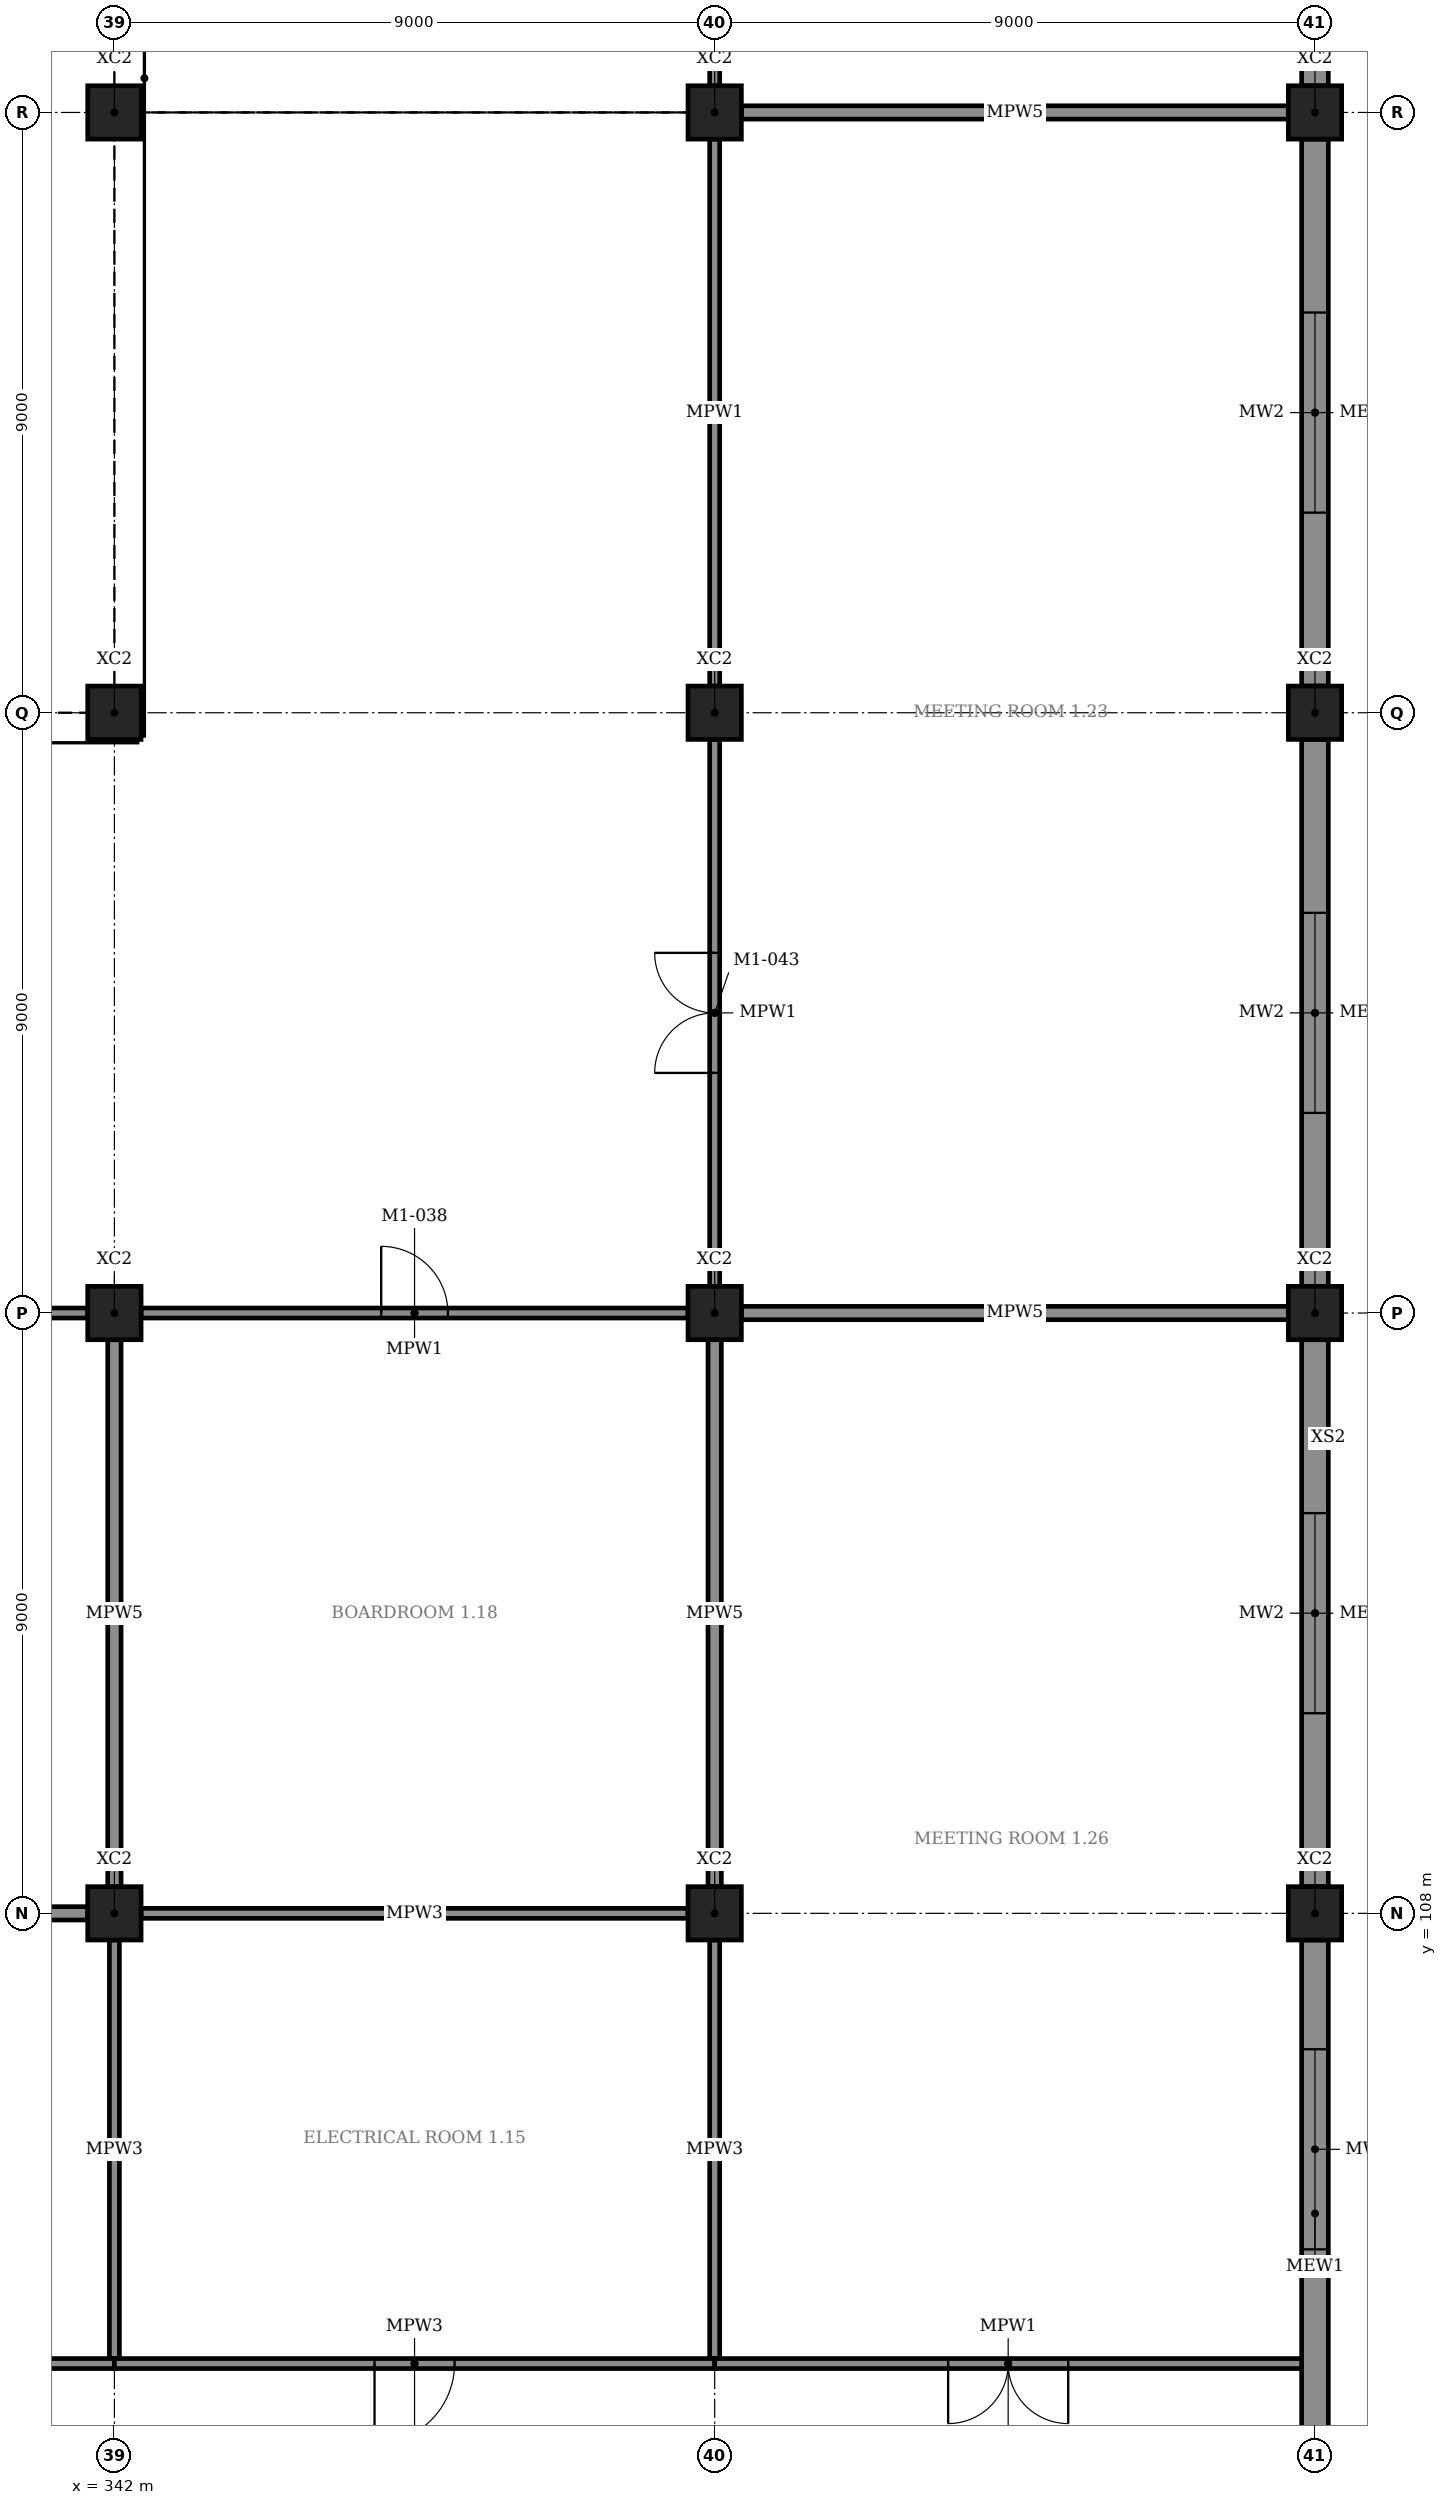
"""IFC4 building model, lengths in metres.
Left out: names, types, materials, properties, quantities, classifications, styles, units other than length and angle.
Written with IfcOpenShell. Run it as: python <this file> out.ifc"""

import sys

from ifc_helpers import new_model, si_unit, direction, frame, frame_2d, origin, origin_2d, place, context, subcontext, project, spatial, rectangle, extrude, element, fill, save


model = new_model("IFC4")
c1 = context("Model", 3, precision=1e-05, world=origin(), true_north=direction((0.0, 1.0)))
c2 = subcontext(c1, "Body", "Model", "MODEL_VIEW")
j1 = project(units=[si_unit("LENGTHUNIT", "METRE"), si_unit("PLANEANGLEUNIT", "RADIAN")], contexts=[c1])
p1 = place(None, origin())
s1 = spatial("IfcSite", under=j1, at=p1, CompositionType="ELEMENT")
p2 = place(p1, origin())
s2 = spatial("IfcBuilding", under=s1, at=p2, CompositionType="ELEMENT")
p3 = place(p2, frame((0.0, 0.0, 6.0)))
s3 = spatial("IfcBuildingStorey", under=s2, at=p3, CompositionType="ELEMENT", Elevation=6.0)
for number, where, z_axis, x_axis in (
    (1, (342.0, 108.0, 0.0), (0.0, 0.0, 1.0), (1.0, 0.0, 0.0)),
    (2, (342.0, 117.0, 0.0), (0.0, 0.0, 1.0), (1.0, 0.0, 0.0)),
    (3, (342.0, 126.0, 0.0), (0.0, 0.0, 1.0), (1.0, 0.0, 0.0)),
    (4, (342.0, 135.0, 0.0), (0.0, 0.0, 1.0), (1.0, 0.0, 0.0)),
    (5, (351.0, 108.0, 0.0), (0.0, 0.0, 1.0), (1.0, 0.0, 0.0)),
    (6, (351.0, 117.0, 0.0), (0.0, 0.0, 1.0), (1.0, 0.0, 0.0)),
    (7, (351.0, 126.0, 0.0), (0.0, 0.0, 1.0), (1.0, 0.0, 0.0)),
    (8, (351.0, 135.0, 0.0), (0.0, 0.0, 1.0), (1.0, 0.0, 0.0)),
    (9, (360.0, 108.0, 0.0), (0.0, 0.0, 1.0), (1.0, 0.0, 0.0)),
    (10, (360.0, 117.0, 0.0), (0.0, 0.0, 1.0), (1.0, 0.0, 0.0)),
    (11, (360.0, 126.0, 0.0), (0.0, 0.0, 1.0), (1.0, 0.0, 0.0)),
    (12, (360.0, 135.0, 0.0), (0.0, 0.0, 1.0), (1.0, 0.0, 0.0)),
):
    element("IfcColumn", number, at=place(p3, frame(where, z_axis=z_axis, x_axis=x_axis)), inside=s3, PredefinedType="COLUMN", context=c2, shape_type="SweptSolid", body=[
        extrude(rectangle(XDim=0.8, YDim=0.8, at=origin_2d()), origin(), (0.0, 0.0, 1.0), 5.5),
    ])
p4 = place(p3, frame((360.0, 99.4, 0.0), z_axis=(0.0, 0.0, 1.0), x_axis=(0.0, 1.0, 0.0)))
e13 = element("IfcWall", 13, at=p4, inside=s3, PredefinedType="STANDARD", context=c2, shape_type="SweptSolid", body=[
    extrude(rectangle(XDim=8.2, YDim=0.4, at=frame_2d((4.1, 0.0))), origin(), (0.0, 0.0, 1.0), 4.32),
])
p5 = place(p4, frame((3.562, 0.0, 0.9)))
e14 = element("IfcOpeningElement", 14, at=p5, cuts=e13, PredefinedType="OPENING", context=c2, shape_type="SweptSolid", body=[
    extrude(rectangle(XDim=3.0, YDim=2.1, at=frame_2d((1.5, 1.05))), frame((0.0, 0.21, 0.0), z_axis=(0.0, -1.0, 0.0), x_axis=(1.0, 0.0, 0.0)), (0.0, 0.0, 1.0), 0.42),
])
p6 = place(p3, frame((360.0, 108.4, 0.0), z_axis=(0.0, 0.0, 1.0), x_axis=(0.0, 1.0, 0.0)))
e15 = element("IfcWall", 15, at=p6, inside=s3, PredefinedType="STANDARD", context=c2, shape_type="SweptSolid", body=[
    extrude(rectangle(XDim=8.2, YDim=0.4, at=frame_2d((4.1, 0.0))), origin(), (0.0, 0.0, 1.0), 4.32),
])
p7 = place(p6, frame((2.6, 0.0, 0.9)))
e16 = element("IfcOpeningElement", 16, at=p7, cuts=e15, PredefinedType="OPENING", context=c2, shape_type="SweptSolid", body=[
    extrude(rectangle(XDim=3.0, YDim=2.1, at=frame_2d((1.5, 1.05))), frame((0.0, 0.21, 0.0), z_axis=(0.0, -1.0, 0.0), x_axis=(1.0, 0.0, 0.0)), (0.0, 0.0, 1.0), 0.42),
])
p8 = place(p3, frame((360.0, 117.4, 0.0), z_axis=(0.0, 0.0, 1.0), x_axis=(0.0, 1.0, 0.0)))
e17 = element("IfcWall", 17, at=p8, inside=s3, PredefinedType="STANDARD", context=c2, shape_type="SweptSolid", body=[
    extrude(rectangle(XDim=8.2, YDim=0.4, at=frame_2d((4.1, 0.0))), origin(), (0.0, 0.0, 1.0), 4.32),
])
p9 = place(p8, frame((2.6, 0.0, 0.9)))
e18 = element("IfcOpeningElement", 18, at=p9, cuts=e17, PredefinedType="OPENING", context=c2, shape_type="SweptSolid", body=[
    extrude(rectangle(XDim=3.0, YDim=2.1, at=frame_2d((1.5, 1.05))), frame((0.0, 0.21, 0.0), z_axis=(0.0, -1.0, 0.0), x_axis=(1.0, 0.0, 0.0)), (0.0, 0.0, 1.0), 0.42),
])
p10 = place(p3, frame((360.0, 126.4, 0.0), z_axis=(0.0, 0.0, 1.0), x_axis=(0.0, 1.0, 0.0)))
e19 = element("IfcWall", 19, at=p10, inside=s3, PredefinedType="STANDARD", context=c2, shape_type="SweptSolid", body=[
    extrude(rectangle(XDim=8.2, YDim=0.4, at=frame_2d((4.1, 0.0))), origin(), (0.0, 0.0, 1.0), 4.32),
])
p11 = place(p10, frame((2.6, 0.0, 0.9)))
e20 = element("IfcOpeningElement", 20, at=p11, cuts=e19, PredefinedType="OPENING", context=c2, shape_type="SweptSolid", body=[
    extrude(rectangle(XDim=3.0, YDim=2.1, at=frame_2d((1.5, 1.05))), frame((0.0, 0.21, 0.0), z_axis=(0.0, -1.0, 0.0), x_axis=(1.0, 0.0, 0.0)), (0.0, 0.0, 1.0), 0.42),
])
p12 = place(p3, frame((360.0, 135.4, 0.0), z_axis=(0.0, 0.0, 1.0), x_axis=(0.0, 1.0, 0.0)))
e21 = element("IfcWall", 21, at=p12, inside=s3, PredefinedType="STANDARD", context=c2, shape_type="SweptSolid", body=[
    extrude(rectangle(XDim=8.2, YDim=0.4, at=frame_2d((4.1, 0.0))), origin(), (0.0, 0.0, 1.0), 4.32),
])
p13 = place(p12, frame((2.6, 0.0, 0.9)))
e22 = element("IfcOpeningElement", 22, at=p13, cuts=e21, PredefinedType="OPENING", context=c2, shape_type="SweptSolid", body=[
    extrude(rectangle(XDim=3.0, YDim=2.1, at=frame_2d((1.5, 1.05))), frame((0.0, 0.21, 0.0), z_axis=(0.0, -1.0, 0.0), x_axis=(1.0, 0.0, 0.0)), (0.0, 0.0, 1.0), 0.42),
])
p14 = place(p3, frame((324.0, 101.25, 0.0), z_axis=(0.0, 0.0, 1.0), x_axis=(1.0, 0.0, 0.0)))
e23 = element("IfcWall", 23, at=p14, inside=s3, PredefinedType="PARTITIONING", context=c2, shape_type="SweptSolid", body=[
    extrude(rectangle(XDim=18.0, YDim=0.15, at=frame_2d((9.0, 0.0))), origin(), (0.0, 0.0, 1.0), 4.32),
])
p15 = place(p14, frame((8.1, 0.0, 0.0)))
e24 = element("IfcOpeningElement", 24, at=p15, cuts=e23, PredefinedType="OPENING", context=c2, shape_type="SweptSolid", body=[
    extrude(rectangle(XDim=1.8, YDim=2.4, at=frame_2d((0.9, 1.2))), frame((0.0, 0.085, 0.0), z_axis=(0.0, -1.0, 0.0), x_axis=(1.0, 0.0, 0.0)), (0.0, 0.0, 1.0), 0.17),
])
p16 = place(p3, frame((333.4, 108.0, 0.0), z_axis=(0.0, 0.0, 1.0), x_axis=(1.0, 0.0, 0.0)))
e25 = element("IfcWall", 25, at=p16, inside=s3, PredefinedType="PARTITIONING", context=c2, shape_type="SweptSolid", body=[
    extrude(rectangle(XDim=8.2, YDim=0.2, at=frame_2d((4.1, 0.0))), origin(), (0.0, 0.0, 1.0), 4.32),
])
p17 = place(p3, frame((342.0, 101.325, 0.0), z_axis=(0.0, 0.0, 1.0), x_axis=(0.0, 1.0, 0.0)))
e26 = element("IfcWall", 26, at=p17, inside=s3, PredefinedType="PARTITIONING", context=c2, shape_type="SweptSolid", body=[
    extrude(rectangle(XDim=6.275, YDim=0.15, at=frame_2d((3.138, 0.0))), origin(), (0.0, 0.0, 1.0), 4.32),
])
p18 = place(p3, frame((342.0, 101.25, 0.0), z_axis=(0.0, 0.0, 1.0), x_axis=(1.0, 0.0, 0.0)))
e27 = element("IfcWall", 27, at=p18, inside=s3, PredefinedType="PARTITIONING", context=c2, shape_type="SweptSolid", body=[
    extrude(rectangle(XDim=9.0, YDim=0.15, at=frame_2d((4.5, 0.0))), origin(), (0.0, 0.0, 1.0), 4.32),
])
p19 = place(p18, frame((3.9, 0.0, 0.0)))
e28 = element("IfcOpeningElement", 28, at=p19, cuts=e27, PredefinedType="OPENING", context=c2, shape_type="SweptSolid", body=[
    extrude(rectangle(XDim=1.2, YDim=2.4, at=frame_2d((0.6, 1.2))), frame((0.0, 0.085, 0.0), z_axis=(0.0, -1.0, 0.0), x_axis=(1.0, 0.0, 0.0)), (0.0, 0.0, 1.0), 0.17),
])
p20 = place(p3, frame((342.4, 108.0, 0.0), z_axis=(0.0, 0.0, 1.0), x_axis=(1.0, 0.0, 0.0)))
e29 = element("IfcWall", 29, at=p20, inside=s3, PredefinedType="PARTITIONING", context=c2, shape_type="SweptSolid", body=[
    extrude(rectangle(XDim=8.2, YDim=0.15, at=frame_2d((4.1, 0.0))), origin(), (0.0, 0.0, 1.0), 4.32),
])
p21 = place(p3, frame((351.0, 101.325, 0.0), z_axis=(0.0, 0.0, 1.0), x_axis=(0.0, 1.0, 0.0)))
e30 = element("IfcWall", 30, at=p21, inside=s3, PredefinedType="PARTITIONING", context=c2, shape_type="SweptSolid", body=[
    extrude(rectangle(XDim=6.275, YDim=0.15, at=frame_2d((3.138, 0.0))), origin(), (0.0, 0.0, 1.0), 4.32),
])
p22 = place(p3, frame((333.4, 117.0, 0.0), z_axis=(0.0, 0.0, 1.0), x_axis=(1.0, 0.0, 0.0)))
e31 = element("IfcWall", 31, at=p22, inside=s3, PredefinedType="PARTITIONING", context=c2, shape_type="SweptSolid", body=[
    extrude(rectangle(XDim=8.2, YDim=0.15, at=frame_2d((4.1, 0.0))), origin(), (0.0, 0.0, 1.0), 4.32),
])
p23 = place(p3, frame((342.0, 108.4, 0.0), z_axis=(0.0, 0.0, 1.0), x_axis=(0.0, 1.0, 0.0)))
e32 = element("IfcWall", 32, at=p23, inside=s3, PredefinedType="PARTITIONING", context=c2, shape_type="SweptSolid", body=[
    extrude(rectangle(XDim=8.2, YDim=0.2, at=frame_2d((4.1, 0.0))), origin(), (0.0, 0.0, 1.0), 4.32),
])
p24 = place(p3, frame((342.4, 117.0, 0.0), z_axis=(0.0, 0.0, 1.0), x_axis=(1.0, 0.0, 0.0)))
e33 = element("IfcWall", 33, at=p24, inside=s3, PredefinedType="PARTITIONING", context=c2, shape_type="SweptSolid", body=[
    extrude(rectangle(XDim=8.2, YDim=0.15, at=frame_2d((4.1, 0.0))), origin(), (0.0, 0.0, 1.0), 4.32),
])
p25 = place(p24, frame((3.6, 0.0, 0.0)))
e34 = element("IfcOpeningElement", 34, at=p25, cuts=e33, PredefinedType="OPENING", context=c2, shape_type="SweptSolid", body=[
    extrude(rectangle(XDim=1.0, YDim=2.4, at=frame_2d((0.5, 1.2))), frame((0.0, 0.085, 0.0), z_axis=(0.0, -1.0, 0.0), x_axis=(1.0, 0.0, 0.0)), (0.0, 0.0, 1.0), 0.17),
])
for number, where, z_axis, x_axis in (
    (35, (351.0, 108.4, 0.0), (0.0, 0.0, 1.0), (0.0, 1.0, 0.0)),
    (36, (351.4, 117.0, 0.0), (0.0, 0.0, 1.0), (1.0, 0.0, 0.0)),
    (37, (351.4, 135.0, 0.0), (0.0, 0.0, 1.0), (1.0, 0.0, 0.0)),
):
    element("IfcWall", number, at=place(p3, frame(where, z_axis=z_axis, x_axis=x_axis)), inside=s3, PredefinedType="PARTITIONING", context=c2, shape_type="SweptSolid", body=[
        extrude(rectangle(XDim=8.2, YDim=0.2, at=frame_2d((4.1, 0.0))), origin(), (0.0, 0.0, 1.0), 4.32),
    ])
p26 = place(p3, frame((351.0, 117.4, 0.0), z_axis=(0.0, 0.0, 1.0), x_axis=(0.0, 1.0, 0.0)))
e38 = element("IfcWall", 38, at=p26, inside=s3, PredefinedType="PARTITIONING", context=c2, shape_type="SweptSolid", body=[
    extrude(rectangle(XDim=8.2, YDim=0.15, at=frame_2d((4.1, 0.0))), origin(), (0.0, 0.0, 1.0), 4.32),
])
p27 = place(p26, frame((3.2, 0.0, 0.0)))
e39 = element("IfcOpeningElement", 39, at=p27, cuts=e38, PredefinedType="OPENING", context=c2, shape_type="SweptSolid", body=[
    extrude(rectangle(XDim=1.8, YDim=2.4, at=frame_2d((0.9, 1.2))), frame((0.0, 0.085, 0.0), z_axis=(0.0, -1.0, 0.0), x_axis=(1.0, 0.0, 0.0)), (0.0, 0.0, 1.0), 0.17),
])
p28 = place(p3, frame((351.0, 126.4, 0.0), z_axis=(0.0, 0.0, 1.0), x_axis=(0.0, 1.0, 0.0)))
e40 = element("IfcWall", 40, at=p28, inside=s3, PredefinedType="PARTITIONING", context=c2, shape_type="SweptSolid", body=[
    extrude(rectangle(XDim=8.2, YDim=0.15, at=frame_2d((4.1, 0.0))), origin(), (0.0, 0.0, 1.0), 4.32),
])
p29 = place(p3, frame((351.0, 135.4, 0.0), z_axis=(0.0, 0.0, 1.0), x_axis=(0.0, 1.0, 0.0)))
e41 = element("IfcWall", 41, at=p29, inside=s3, PredefinedType="PARTITIONING", context=c2, shape_type="SweptSolid", body=[
    extrude(rectangle(XDim=8.2, YDim=0.15, at=frame_2d((4.1, 0.0))), origin(), (0.0, 0.0, 1.0), 4.32),
])
p30 = place(p29, frame((6.3, 0.0, 0.0)))
e42 = element("IfcOpeningElement", 42, at=p30, cuts=e41, PredefinedType="OPENING", context=c2, shape_type="SweptSolid", body=[
    extrude(rectangle(XDim=1.0, YDim=2.4, at=frame_2d((0.5, 1.2))), frame((0.0, 0.085, 0.0), z_axis=(0.0, -1.0, 0.0), x_axis=(1.0, 0.0, 0.0)), (0.0, 0.0, 1.0), 0.17),
])
p31 = place(p3, frame((351.0, 101.25, 0.0), z_axis=(0.0, 0.0, 1.0), x_axis=(1.0, 0.0, 0.0)))
e43 = element("IfcWall", 43, at=p31, inside=s3, PredefinedType="PARTITIONING", context=c2, shape_type="SweptSolid", body=[
    extrude(rectangle(XDim=8.8, YDim=0.15, at=frame_2d((4.4, 0.0))), origin(), (0.0, 0.0, 1.0), 4.32),
])
p32 = place(p31, frame((3.5, 0.0, 0.0)))
e44 = element("IfcOpeningElement", 44, at=p32, cuts=e43, PredefinedType="OPENING", context=c2, shape_type="SweptSolid", body=[
    extrude(rectangle(XDim=1.8, YDim=2.4, at=frame_2d((0.9, 1.2))), frame((0.0, 0.085, 0.0), z_axis=(0.0, -1.0, 0.0), x_axis=(1.0, 0.0, 0.0)), (0.0, 0.0, 1.0), 0.17),
])
p33 = place(p5, origin())
e45 = element("IfcWindow", 45, at=p33, inside=s3, PartitioningType="TRIPLE_PANEL_VERTICAL", PredefinedType="WINDOW", context=c2, shape_type="SweptSolid", body=[
    extrude(rectangle(XDim=3.0, YDim=2.1, at=frame_2d((1.5, 1.05))), frame((0.0, 0.03, 0.0), z_axis=(0.0, -1.0, 0.0), x_axis=(1.0, 0.0, 0.0)), (0.0, 0.0, 1.0), 0.06),
])
fill(e14, e45)
p34 = place(p7, origin())
e46 = element("IfcWindow", 46, at=p34, inside=s3, PartitioningType="TRIPLE_PANEL_VERTICAL", PredefinedType="WINDOW", context=c2, shape_type="SweptSolid", body=[
    extrude(rectangle(XDim=3.0, YDim=2.1, at=frame_2d((1.5, 1.05))), frame((0.0, 0.03, 0.0), z_axis=(0.0, -1.0, 0.0), x_axis=(1.0, 0.0, 0.0)), (0.0, 0.0, 1.0), 0.06),
])
fill(e16, e46)
p35 = place(p9, origin())
e47 = element("IfcWindow", 47, at=p35, inside=s3, PartitioningType="TRIPLE_PANEL_VERTICAL", PredefinedType="WINDOW", context=c2, shape_type="SweptSolid", body=[
    extrude(rectangle(XDim=3.0, YDim=2.1, at=frame_2d((1.5, 1.05))), frame((0.0, 0.03, 0.0), z_axis=(0.0, -1.0, 0.0), x_axis=(1.0, 0.0, 0.0)), (0.0, 0.0, 1.0), 0.06),
])
fill(e18, e47)
p36 = place(p11, origin())
e48 = element("IfcWindow", 48, at=p36, inside=s3, PartitioningType="TRIPLE_PANEL_VERTICAL", PredefinedType="WINDOW", context=c2, shape_type="SweptSolid", body=[
    extrude(rectangle(XDim=3.0, YDim=2.1, at=frame_2d((1.5, 1.05))), frame((0.0, 0.03, 0.0), z_axis=(0.0, -1.0, 0.0), x_axis=(1.0, 0.0, 0.0)), (0.0, 0.0, 1.0), 0.06),
])
fill(e20, e48)
p37 = place(p19, frame((1.2, 0.0, 0.0), z_axis=(0.0, 0.0, 1.0), x_axis=(-1.0, 0.0, 0.0)))
e49 = element("IfcDoor", 49, at=p37, inside=s3, OperationType="SINGLE_SWING_LEFT", PredefinedType="DOOR", context=c2, shape_type="SweptSolid", body=[
    extrude(rectangle(XDim=1.2, YDim=2.4, at=frame_2d((0.6, 1.2))), frame((0.0, 0.025, 0.0), z_axis=(0.0, -1.0, 0.0), x_axis=(1.0, 0.0, 0.0)), (0.0, 0.0, 1.0), 0.05),
])
fill(e28, e49)
p38 = place(p25, origin())
e50 = element("IfcDoor", 50, at=p38, inside=s3, OperationType="SINGLE_SWING_LEFT", PredefinedType="DOOR", context=c2, shape_type="SweptSolid", body=[
    extrude(rectangle(XDim=1.0, YDim=2.4, at=frame_2d((0.5, 1.2))), frame((0.0, 0.025, 0.0), z_axis=(0.0, -1.0, 0.0), x_axis=(1.0, 0.0, 0.0)), (0.0, 0.0, 1.0), 0.05),
])
fill(e34, e50)
p39 = place(p27, origin())
e51 = element("IfcDoor", 51, at=p39, inside=s3, OperationType="DOUBLE_DOOR_SINGLE_SWING", PredefinedType="DOOR", context=c2, shape_type="SweptSolid", body=[
    extrude(rectangle(XDim=1.8, YDim=2.4, at=frame_2d((0.9, 1.2))), frame((0.0, 0.025, 0.0), z_axis=(0.0, -1.0, 0.0), x_axis=(1.0, 0.0, 0.0)), (0.0, 0.0, 1.0), 0.05),
])
fill(e39, e51)
p40 = place(p32, frame((1.8, 0.0, 0.0), z_axis=(0.0, 0.0, 1.0), x_axis=(-1.0, 0.0, 0.0)))
e52 = element("IfcDoor", 52, at=p40, inside=s3, OperationType="DOUBLE_DOOR_SINGLE_SWING", PredefinedType="DOOR", context=c2, shape_type="SweptSolid", body=[
    extrude(rectangle(XDim=1.8, YDim=2.4, at=frame_2d((0.9, 1.2))), frame((0.0, 0.025, 0.0), z_axis=(0.0, -1.0, 0.0), x_axis=(1.0, 0.0, 0.0)), (0.0, 0.0, 1.0), 0.05),
])
fill(e44, e52)
save(model, sys.argv[1])
